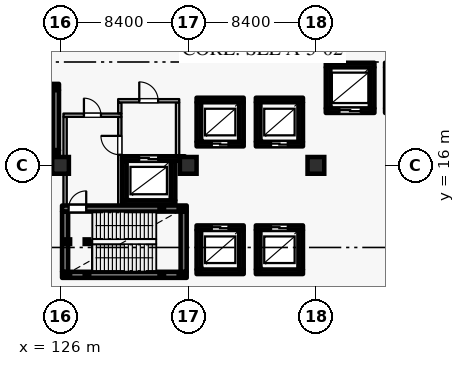
"""IFC4 building model, lengths in metres.
Left out: names, types, materials, properties, quantities, classifications, styles, units other than length and angle.
Written with IfcOpenShell. Run it as: python <this file> out.ifc"""

import sys

from ifc_helpers import new_model, si_unit, direction, frame, frame_2d, origin, origin_2d, place, context, subcontext, project, spatial, rectangle, hollow_rectangle, circle, extrude, element, fill, save


model = new_model("IFC4")
c1 = context("Model", 3, precision=1e-05, world=origin(), true_north=direction((0.0, 1.0)))
c2 = subcontext(c1, "Body", "Model", "MODEL_VIEW")
j1 = project(units=[si_unit("LENGTHUNIT", "METRE"), si_unit("PLANEANGLEUNIT", "RADIAN")], contexts=[c1])
p1 = place(None, origin())
s1 = spatial("IfcSite", under=j1, at=p1, CompositionType="ELEMENT")
p2 = place(p1, origin())
s2 = spatial("IfcBuilding", under=s1, at=p2, CompositionType="ELEMENT")
p3 = place(p2, origin())
s3 = spatial("IfcBuildingStorey", under=s2, at=p3, CompositionType="ELEMENT", Elevation=0.0)
for number, where, z_axis, x_axis in (
    (1, (126.0, 16.0, 0.0), (0.0, 0.0, 1.0), (1.0, 0.0, 0.0)),
    (2, (134.4, 16.0, 0.0), (0.0, 0.0, 1.0), (1.0, 0.0, 0.0)),
    (3, (142.8, 16.0, 0.0), (0.0, 0.0, 1.0), (1.0, 0.0, 0.0)),
):
    element("IfcColumn", number, at=place(p3, frame(where, z_axis=z_axis, x_axis=x_axis)), inside=s3, PredefinedType="COLUMN", context=c2, shape_type="SweptSolid", body=[
        extrude(circle(Radius=0.55, at=origin_2d()), origin(), (0.0, 0.0, 1.0), 6.0),
    ])
p4 = place(p3, frame((134.95, 17.4, 0.0), z_axis=(0.0, 0.0, 1.0), x_axis=(1.0, 0.0, 0.0)))
e4 = element("IfcWall", 4, at=p4, inside=s3, PredefinedType="SHEAR", context=c2, shape_type="SweptSolid", body=[
    extrude(rectangle(XDim=3.1, YDim=0.3, at=frame_2d((1.55, 0.0))), origin(), (0.0, 0.0, 1.0), 5.675),
])
p5 = place(p4, frame((1.0, 0.0, 0.0)))
e5 = element("IfcOpeningElement", 5, at=p5, cuts=e4, PredefinedType="OPENING", context=c2, shape_type="SweptSolid", body=[
    extrude(rectangle(XDim=1.1, YDim=2.2, at=frame_2d((0.55, 1.1))), frame((0.0, 0.16, 0.0), z_axis=(0.0, -1.0, 0.0), x_axis=(1.0, 0.0, 0.0)), (0.0, 0.0, 1.0), 0.32),
])
p6 = place(p3, frame((137.9, 17.555, 0.0), z_axis=(0.0, 0.0, 1.0), x_axis=(0.0, 1.0, 0.0)))
e6 = element("IfcWall", 6, at=p6, inside=s3, PredefinedType="SHEAR", context=c2, shape_type="SweptSolid", body=[
    extrude(rectangle(XDim=2.59, YDim=0.3, at=frame_2d((1.295, 0.0))), origin(), (0.0, 0.0, 1.0), 5.675),
])
p7 = place(p3, frame((138.05, 20.3, 0.0), z_axis=(0.0, 0.0, 1.0), x_axis=(-1.0, 0.0, 0.0)))
e7 = element("IfcWall", 7, at=p7, inside=s3, PredefinedType="SHEAR", context=c2, shape_type="SweptSolid", body=[
    extrude(rectangle(XDim=3.1, YDim=0.3, at=frame_2d((1.55, 0.0))), origin(), (0.0, 0.0, 1.0), 5.675),
])
p8 = place(p3, frame((135.1, 20.145, 0.0), z_axis=(0.0, 0.0, 1.0), x_axis=(0.0, -1.0, 0.0)))
e8 = element("IfcWall", 8, at=p8, inside=s3, PredefinedType="SHEAR", context=c2, shape_type="SweptSolid", body=[
    extrude(rectangle(XDim=2.59, YDim=0.3, at=frame_2d((1.295, 0.0))), origin(), (0.0, 0.0, 1.0), 5.675),
])
p9 = place(p3, frame((138.85, 17.4, 0.0), z_axis=(0.0, 0.0, 1.0), x_axis=(1.0, 0.0, 0.0)))
e9 = element("IfcWall", 9, at=p9, inside=s3, PredefinedType="SHEAR", context=c2, shape_type="SweptSolid", body=[
    extrude(rectangle(XDim=3.1, YDim=0.3, at=frame_2d((1.55, 0.0))), origin(), (0.0, 0.0, 1.0), 5.675),
])
p10 = place(p9, frame((1.0, 0.0, 0.0)))
e10 = element("IfcOpeningElement", 10, at=p10, cuts=e9, PredefinedType="OPENING", context=c2, shape_type="SweptSolid", body=[
    extrude(rectangle(XDim=1.1, YDim=2.2, at=frame_2d((0.55, 1.1))), frame((0.0, 0.16, 0.0), z_axis=(0.0, -1.0, 0.0), x_axis=(1.0, 0.0, 0.0)), (0.0, 0.0, 1.0), 0.32),
])
p11 = place(p3, frame((141.8, 17.555, 0.0), z_axis=(0.0, 0.0, 1.0), x_axis=(0.0, 1.0, 0.0)))
e11 = element("IfcWall", 11, at=p11, inside=s3, PredefinedType="SHEAR", context=c2, shape_type="SweptSolid", body=[
    extrude(rectangle(XDim=2.59, YDim=0.3, at=frame_2d((1.295, 0.0))), origin(), (0.0, 0.0, 1.0), 5.675),
])
p12 = place(p3, frame((141.95, 20.3, 0.0), z_axis=(0.0, 0.0, 1.0), x_axis=(-1.0, 0.0, 0.0)))
e12 = element("IfcWall", 12, at=p12, inside=s3, PredefinedType="SHEAR", context=c2, shape_type="SweptSolid", body=[
    extrude(rectangle(XDim=3.1, YDim=0.3, at=frame_2d((1.55, 0.0))), origin(), (0.0, 0.0, 1.0), 5.675),
])
p13 = place(p3, frame((139.0, 20.145, 0.0), z_axis=(0.0, 0.0, 1.0), x_axis=(0.0, -1.0, 0.0)))
e13 = element("IfcWall", 13, at=p13, inside=s3, PredefinedType="SHEAR", context=c2, shape_type="SweptSolid", body=[
    extrude(rectangle(XDim=2.59, YDim=0.3, at=frame_2d((1.295, 0.0))), origin(), (0.0, 0.0, 1.0), 5.675),
])
p14 = place(p3, frame((134.95, 9.0, 0.0), z_axis=(0.0, 0.0, 1.0), x_axis=(1.0, 0.0, 0.0)))
e14 = element("IfcWall", 14, at=p14, inside=s3, PredefinedType="SHEAR", context=c2, shape_type="SweptSolid", body=[
    extrude(rectangle(XDim=3.1, YDim=0.3, at=frame_2d((1.55, 0.0))), origin(), (0.0, 0.0, 1.0), 5.675),
])
p15 = place(p3, frame((137.9, 9.155, 0.0), z_axis=(0.0, 0.0, 1.0), x_axis=(0.0, 1.0, 0.0)))
e15 = element("IfcWall", 15, at=p15, inside=s3, PredefinedType="SHEAR", context=c2, shape_type="SweptSolid", body=[
    extrude(rectangle(XDim=2.59, YDim=0.3, at=frame_2d((1.295, 0.0))), origin(), (0.0, 0.0, 1.0), 5.675),
])
p16 = place(p3, frame((138.05, 11.9, 0.0), z_axis=(0.0, 0.0, 1.0), x_axis=(-1.0, 0.0, 0.0)))
e16 = element("IfcWall", 16, at=p16, inside=s3, PredefinedType="SHEAR", context=c2, shape_type="SweptSolid", body=[
    extrude(rectangle(XDim=3.1, YDim=0.3, at=frame_2d((1.55, 0.0))), origin(), (0.0, 0.0, 1.0), 5.675),
])
p17 = place(p16, frame((1.0, 0.0, 0.0)))
e17 = element("IfcOpeningElement", 17, at=p17, cuts=e16, PredefinedType="OPENING", context=c2, shape_type="SweptSolid", body=[
    extrude(rectangle(XDim=1.1, YDim=2.2, at=frame_2d((0.55, 1.1))), frame((0.0, 0.16, 0.0), z_axis=(0.0, -1.0, 0.0), x_axis=(1.0, 0.0, 0.0)), (0.0, 0.0, 1.0), 0.32),
])
p18 = place(p3, frame((135.1, 11.745, 0.0), z_axis=(0.0, 0.0, 1.0), x_axis=(0.0, -1.0, 0.0)))
e18 = element("IfcWall", 18, at=p18, inside=s3, PredefinedType="SHEAR", context=c2, shape_type="SweptSolid", body=[
    extrude(rectangle(XDim=2.59, YDim=0.3, at=frame_2d((1.295, 0.0))), origin(), (0.0, 0.0, 1.0), 5.675),
])
p19 = place(p3, frame((138.85, 9.0, 0.0), z_axis=(0.0, 0.0, 1.0), x_axis=(1.0, 0.0, 0.0)))
e19 = element("IfcWall", 19, at=p19, inside=s3, PredefinedType="SHEAR", context=c2, shape_type="SweptSolid", body=[
    extrude(rectangle(XDim=3.1, YDim=0.3, at=frame_2d((1.55, 0.0))), origin(), (0.0, 0.0, 1.0), 5.675),
])
p20 = place(p3, frame((141.8, 9.155, 0.0), z_axis=(0.0, 0.0, 1.0), x_axis=(0.0, 1.0, 0.0)))
e20 = element("IfcWall", 20, at=p20, inside=s3, PredefinedType="SHEAR", context=c2, shape_type="SweptSolid", body=[
    extrude(rectangle(XDim=2.59, YDim=0.3, at=frame_2d((1.295, 0.0))), origin(), (0.0, 0.0, 1.0), 5.675),
])
p21 = place(p3, frame((141.95, 11.9, 0.0), z_axis=(0.0, 0.0, 1.0), x_axis=(-1.0, 0.0, 0.0)))
e21 = element("IfcWall", 21, at=p21, inside=s3, PredefinedType="SHEAR", context=c2, shape_type="SweptSolid", body=[
    extrude(rectangle(XDim=3.1, YDim=0.3, at=frame_2d((1.55, 0.0))), origin(), (0.0, 0.0, 1.0), 5.675),
])
p22 = place(p21, frame((1.0, 0.0, 0.0)))
e22 = element("IfcOpeningElement", 22, at=p22, cuts=e21, PredefinedType="OPENING", context=c2, shape_type="SweptSolid", body=[
    extrude(rectangle(XDim=1.1, YDim=2.2, at=frame_2d((0.55, 1.1))), frame((0.0, 0.16, 0.0), z_axis=(0.0, -1.0, 0.0), x_axis=(1.0, 0.0, 0.0)), (0.0, 0.0, 1.0), 0.32),
])
p23 = place(p3, frame((139.0, 11.745, 0.0), z_axis=(0.0, 0.0, 1.0), x_axis=(0.0, -1.0, 0.0)))
e23 = element("IfcWall", 23, at=p23, inside=s3, PredefinedType="SHEAR", context=c2, shape_type="SweptSolid", body=[
    extrude(rectangle(XDim=2.59, YDim=0.3, at=frame_2d((1.295, 0.0))), origin(), (0.0, 0.0, 1.0), 5.675),
])
p24 = place(p3, frame((130.05, 13.55, 0.0), z_axis=(0.0, 0.0, 1.0), x_axis=(1.0, 0.0, 0.0)))
e24 = element("IfcWall", 24, at=p24, inside=s3, PredefinedType="SHEAR", context=c2, shape_type="SweptSolid", body=[
    extrude(rectangle(XDim=3.5, YDim=0.3, at=frame_2d((1.75, 0.0))), origin(), (0.0, 0.0, 1.0), 5.675),
])
p25 = place(p3, frame((133.4, 13.705, 0.0), z_axis=(0.0, 0.0, 1.0), x_axis=(0.0, 1.0, 0.0)))
e25 = element("IfcWall", 25, at=p25, inside=s3, PredefinedType="SHEAR", context=c2, shape_type="SweptSolid", body=[
    extrude(rectangle(XDim=2.59, YDim=0.3, at=frame_2d((1.295, 0.0))), origin(), (0.0, 0.0, 1.0), 5.675),
])
p26 = place(p3, frame((134.18, 16.45, 0.0), z_axis=(0.0, 0.0, 1.0), x_axis=(-1.0, 0.0, 0.0)))
e26 = element("IfcWall", 26, at=p26, inside=s3, PredefinedType="SHEAR", context=c2, shape_type="SweptSolid", body=[
    extrude(rectangle(XDim=4.13, YDim=0.3, at=frame_2d((2.065, 0.0))), origin(), (0.0, 0.0, 1.0), 5.675),
])
p27 = place(p26, frame((1.755, 0.0, 0.0)))
e27 = element("IfcOpeningElement", 27, at=p27, cuts=e26, PredefinedType="OPENING", context=c2, shape_type="SweptSolid", body=[
    extrude(rectangle(XDim=1.25, YDim=2.25, at=frame_2d((0.625, 1.125))), frame((0.0, 0.16, 0.0), z_axis=(0.0, -1.0, 0.0), x_axis=(1.0, 0.0, 0.0)), (0.0, 0.0, 1.0), 0.32),
])
p28 = place(p3, frame((130.2, 16.295, 0.0), z_axis=(0.0, 0.0, 1.0), x_axis=(0.0, -1.0, 0.0)))
e28 = element("IfcWall", 28, at=p28, inside=s3, PredefinedType="SHEAR", context=c2, shape_type="SweptSolid", body=[
    extrude(rectangle(XDim=2.59, YDim=0.3, at=frame_2d((1.295, 0.0))), origin(), (0.0, 0.0, 1.0), 5.675),
])
p29 = place(p3, frame((143.45, 19.6, 0.0), z_axis=(0.0, 0.0, 1.0), x_axis=(1.0, 0.0, 0.0)))
e29 = element("IfcWall", 29, at=p29, inside=s3, PredefinedType="SHEAR", context=c2, shape_type="SweptSolid", body=[
    extrude(rectangle(XDim=3.2, YDim=0.3, at=frame_2d((1.6, 0.0))), origin(), (0.0, 0.0, 1.0), 5.675),
])
p30 = place(p29, frame((0.9, 0.0, 0.0)))
e30 = element("IfcOpeningElement", 30, at=p30, cuts=e29, PredefinedType="OPENING", context=c2, shape_type="SweptSolid", body=[
    extrude(rectangle(XDim=1.4, YDim=2.35, at=frame_2d((0.7, 1.175))), frame((0.0, 0.16, 0.0), z_axis=(0.0, -1.0, 0.0), x_axis=(1.0, 0.0, 0.0)), (0.0, 0.0, 1.0), 0.32),
])
p31 = place(p3, frame((146.5, 19.755, 0.0), z_axis=(0.0, 0.0, 1.0), x_axis=(0.0, 1.0, 0.0)))
e31 = element("IfcWall", 31, at=p31, inside=s3, PredefinedType="SHEAR", context=c2, shape_type="SweptSolid", body=[
    extrude(rectangle(XDim=2.69, YDim=0.3, at=frame_2d((1.345, 0.0))), origin(), (0.0, 0.0, 1.0), 5.675),
])
p32 = place(p3, frame((146.65, 22.6, 0.0), z_axis=(0.0, 0.0, 1.0), x_axis=(-1.0, 0.0, 0.0)))
e32 = element("IfcWall", 32, at=p32, inside=s3, PredefinedType="SHEAR", context=c2, shape_type="SweptSolid", body=[
    extrude(rectangle(XDim=3.2, YDim=0.3, at=frame_2d((1.6, 0.0))), origin(), (0.0, 0.0, 1.0), 5.675),
])
p33 = place(p3, frame((143.6, 22.445, 0.0), z_axis=(0.0, 0.0, 1.0), x_axis=(0.0, -1.0, 0.0)))
e33 = element("IfcWall", 33, at=p33, inside=s3, PredefinedType="SHEAR", context=c2, shape_type="SweptSolid", body=[
    extrude(rectangle(XDim=2.69, YDim=0.3, at=frame_2d((1.345, 0.0))), origin(), (0.0, 0.0, 1.0), 5.675),
])
p34 = place(p3, frame((126.1, 8.8, 0.0), z_axis=(0.0, 0.0, 1.0), x_axis=(1.0, 0.0, 0.0)))
e34 = element("IfcWall", 34, at=p34, inside=s3, PredefinedType="SHEAR", context=c2, shape_type="SweptSolid", body=[
    extrude(rectangle(XDim=8.2, YDim=0.4, at=frame_2d((4.1, 0.0))), origin(), (0.0, 0.0, 1.0), 5.675),
])
p35 = place(p3, frame((134.1, 9.005, 0.0), z_axis=(0.0, 0.0, 1.0), x_axis=(0.0, 1.0, 0.0)))
e35 = element("IfcWall", 35, at=p35, inside=s3, PredefinedType="SHEAR", context=c2, shape_type="SweptSolid", body=[
    extrude(rectangle(XDim=3.95, YDim=0.4, at=frame_2d((1.975, 0.0))), origin(), (0.0, 0.0, 1.0), 5.675),
])
p36 = place(p3, frame((126.1, 13.16, 0.0), z_axis=(0.0, 0.0, 1.0), x_axis=(1.0, 0.0, 0.0)))
e36 = element("IfcWall", 36, at=p36, inside=s3, PredefinedType="SHEAR", context=c2, shape_type="SweptSolid", body=[
    extrude(rectangle(XDim=8.2, YDim=0.4, at=frame_2d((4.1, 0.0))), origin(), (0.0, 0.0, 1.0), 5.675),
])
p37 = place(p36, frame((0.43, 0.0, 0.0)))
e37 = element("IfcOpeningElement", 37, at=p37, cuts=e36, PredefinedType="OPENING", context=c2, shape_type="SweptSolid", body=[
    extrude(rectangle(XDim=1.16, YDim=2.2, at=frame_2d((0.58, 1.1))), frame((0.0, 0.21, 0.0), z_axis=(0.0, -1.0, 0.0), x_axis=(1.0, 0.0, 0.0)), (0.0, 0.0, 1.0), 0.42),
])
p38 = place(p3, frame((126.3, 9.005, 0.0), z_axis=(0.0, 0.0, 1.0), x_axis=(0.0, 1.0, 0.0)))
e38 = element("IfcWall", 38, at=p38, inside=s3, PredefinedType="SHEAR", context=c2, shape_type="SweptSolid", body=[
    extrude(rectangle(XDim=3.95, YDim=0.4, at=frame_2d((1.975, 0.0))), origin(), (0.0, 0.0, 1.0), 5.675),
])
p39 = place(p3, frame((126.3, 13.365, 0.0), z_axis=(0.0, 0.0, 1.0), x_axis=(0.0, 1.0, 0.0)))
e39 = element("IfcWall", 39, at=p39, inside=s3, PredefinedType="PARTITIONING", context=c2, shape_type="SweptSolid", body=[
    extrude(rectangle(XDim=5.82, YDim=0.22, at=frame_2d((2.91, 0.0))), origin(), (0.0, 0.0, 1.0), 4.75),
])
p40 = place(p3, frame((126.19, 19.3, 0.0), z_axis=(0.0, 0.0, 1.0), x_axis=(1.0, 0.0, 0.0)))
e40 = element("IfcWall", 40, at=p40, inside=s3, PredefinedType="PARTITIONING", context=c2, shape_type="SweptSolid", body=[
    extrude(rectangle(XDim=3.82, YDim=0.22, at=frame_2d((1.91, 0.0))), origin(), (0.0, 0.0, 1.0), 5.675),
])
p41 = place(p40, frame((1.35, 0.0, 0.0)))
e41 = element("IfcOpeningElement", 41, at=p41, cuts=e40, PredefinedType="OPENING", context=c2, shape_type="SweptSolid", body=[
    extrude(rectangle(XDim=1.12, YDim=2.2, at=frame_2d((0.56, 1.1))), frame((0.0, 0.12, 0.0), z_axis=(0.0, -1.0, 0.0), x_axis=(1.0, 0.0, 0.0)), (0.0, 0.0, 1.0), 0.24),
])
p42 = place(p3, frame((129.9, 13.365, 0.0), z_axis=(0.0, 0.0, 1.0), x_axis=(0.0, 1.0, 0.0)))
e42 = element("IfcWall", 42, at=p42, inside=s3, PredefinedType="PARTITIONING", context=c2, shape_type="SweptSolid", body=[
    extrude(rectangle(XDim=5.82, YDim=0.22, at=frame_2d((2.91, 0.0))), origin(), (0.0, 0.0, 1.0), 5.675),
])
p43 = place(p42, frame((3.335, 0.0, 0.0)))
e43 = element("IfcOpeningElement", 43, at=p43, cuts=e42, PredefinedType="OPENING", context=c2, shape_type="SweptSolid", body=[
    extrude(rectangle(XDim=1.24, YDim=2.2, at=frame_2d((0.62, 1.1))), frame((0.0, 0.12, 0.0), z_axis=(0.0, -1.0, 0.0), x_axis=(1.0, 0.0, 0.0)), (0.0, 0.0, 1.0), 0.24),
])
p44 = place(p3, frame((129.9, 19.415, 0.0), z_axis=(0.0, 0.0, 1.0), x_axis=(0.0, 1.0, 0.0)))
e44 = element("IfcWall", 44, at=p44, inside=s3, PredefinedType="PARTITIONING", context=c2, shape_type="SweptSolid", body=[
    extrude(rectangle(XDim=0.72, YDim=0.22, at=frame_2d((0.36, 0.0))), origin(), (0.0, 0.0, 1.0), 5.675),
])
p45 = place(p3, frame((133.7, 16.605, 0.0), z_axis=(0.0, 0.0, 1.0), x_axis=(0.0, 1.0, 0.0)))
e45 = element("IfcWall", 45, at=p45, inside=s3, PredefinedType="PARTITIONING", context=c2, shape_type="SweptSolid", body=[
    extrude(rectangle(XDim=3.53, YDim=0.22, at=frame_2d((1.765, 0.0))), origin(), (0.0, 0.0, 1.0), 5.675),
])
p46 = place(p3, frame((129.79, 20.25, 0.0), z_axis=(0.0, 0.0, 1.0), x_axis=(1.0, 0.0, 0.0)))
e46 = element("IfcWall", 46, at=p46, inside=s3, PredefinedType="PARTITIONING", context=c2, shape_type="SweptSolid", body=[
    extrude(rectangle(XDim=4.02, YDim=0.22, at=frame_2d((2.01, 0.0))), origin(), (0.0, 0.0, 1.0), 5.675),
])
p47 = place(p46, frame((1.39, 0.0, 0.0)))
e47 = element("IfcOpeningElement", 47, at=p47, cuts=e46, PredefinedType="OPENING", context=c2, shape_type="SweptSolid", body=[
    extrude(rectangle(XDim=1.24, YDim=2.2, at=frame_2d((0.62, 1.1))), frame((0.0, 0.12, 0.0), z_axis=(0.0, -1.0, 0.0), x_axis=(1.0, 0.0, 0.0)), (0.0, 0.0, 1.0), 0.24),
])
for number, where, z_axis, x_axis in (
    (48, (126.48, 8.8, 0.0), (0.0, 0.0, 1.0), (1.0, 0.0, 0.0)),
    (49, (126.48, 10.98, 0.0), (0.0, 0.0, 1.0), (1.0, 0.0, 0.0)),
    (50, (127.74, 8.8, 0.0), (0.0, 0.0, 1.0), (1.0, 0.0, 0.0)),
    (51, (127.74, 10.98, 0.0), (0.0, 0.0, 1.0), (1.0, 0.0, 0.0)),
):
    element("IfcColumn", number, at=place(p3, frame(where, z_axis=z_axis, x_axis=x_axis)), inside=s3, PredefinedType="COLUMN", context=c2, shape_type="SweptSolid", body=[
        extrude(hollow_rectangle(XDim=0.3, YDim=0.3, WallThickness=0.012, at=origin_2d()), origin(), (0.0, 0.0, 1.0), 5.82),
    ])
for number, where, z_axis, x_axis in (
    (52, (132.66, 8.8, -2.7), (0.0, 0.0, 1.0), (1.0, 0.0, 0.0)),
    (53, (132.66, 13.16, -2.7), (0.0, 0.0, 1.0), (1.0, 0.0, 0.0)),
    (54, (133.92, 8.8, -2.7), (0.0, 0.0, 1.0), (1.0, 0.0, 0.0)),
    (55, (133.92, 13.16, -2.7), (0.0, 0.0, 1.0), (1.0, 0.0, 0.0)),
):
    element("IfcColumn", number, at=place(p3, frame(where, z_axis=z_axis, x_axis=x_axis)), inside=s3, PredefinedType="COLUMN", context=c2, shape_type="SweptSolid", body=[
        extrude(hollow_rectangle(XDim=0.3, YDim=0.3, WallThickness=0.012, at=origin_2d()), origin(), (0.0, 0.0, 1.0), 5.52),
    ])
p48 = place(p3, frame((117.7, 16.8, 0.0), z_axis=(0.0, 0.0, 1.0), x_axis=(1.0, 0.0, 0.0)))
e56 = element("IfcWall", 56, at=p48, inside=s3, PredefinedType="SHEAR", context=c2, shape_type="SweptSolid", body=[
    extrude(rectangle(XDim=8.2, YDim=0.4, at=frame_2d((4.1, 0.0))), origin(), (0.0, 0.0, 1.0), 5.675),
])
p49 = place(p3, frame((125.7, 17.005, 0.0), z_axis=(0.0, 0.0, 1.0), x_axis=(0.0, 1.0, 0.0)))
e57 = element("IfcWall", 57, at=p49, inside=s3, PredefinedType="SHEAR", context=c2, shape_type="SweptSolid", body=[
    extrude(rectangle(XDim=3.95, YDim=0.4, at=frame_2d((1.975, 0.0))), origin(), (0.0, 0.0, 1.0), 5.675),
])
p50 = place(p3, frame((117.7, 21.16, 0.0), z_axis=(0.0, 0.0, 1.0), x_axis=(1.0, 0.0, 0.0)))
e58 = element("IfcWall", 58, at=p50, inside=s3, PredefinedType="SHEAR", context=c2, shape_type="SweptSolid", body=[
    extrude(rectangle(XDim=8.2, YDim=0.4, at=frame_2d((4.1, 0.0))), origin(), (0.0, 0.0, 1.0), 5.675),
])
p51 = place(p50, frame((0.43, 0.0, 0.0)))
e59 = element("IfcOpeningElement", 59, at=p51, cuts=e58, PredefinedType="OPENING", context=c2, shape_type="SweptSolid", body=[
    extrude(rectangle(XDim=1.16, YDim=2.2, at=frame_2d((0.58, 1.1))), frame((0.0, 0.21, 0.0), z_axis=(0.0, -1.0, 0.0), x_axis=(1.0, 0.0, 0.0)), (0.0, 0.0, 1.0), 0.42),
])
for number, where, z_axis, x_axis in (
    (60, (125.52, 16.8, -2.7), (0.0, 0.0, 1.0), (1.0, 0.0, 0.0)),
    (61, (125.52, 21.16, -2.7), (0.0, 0.0, 1.0), (1.0, 0.0, 0.0)),
):
    element("IfcColumn", number, at=place(p3, frame(where, z_axis=z_axis, x_axis=x_axis)), inside=s3, PredefinedType="COLUMN", context=c2, shape_type="SweptSolid", body=[
        extrude(hollow_rectangle(XDim=0.3, YDim=0.3, WallThickness=0.012, at=origin_2d()), origin(), (0.0, 0.0, 1.0), 5.52),
    ])
p52 = place(p5, origin())
e62 = element("IfcDoor", 62, at=p52, inside=s3, OperationType="DOUBLE_DOOR_SLIDING", PredefinedType="DOOR", context=c2, shape_type="SweptSolid", body=[
    extrude(rectangle(XDim=1.1, YDim=2.2, at=frame_2d((0.55, 1.1))), frame((0.0, 0.025, 0.0), z_axis=(0.0, -1.0, 0.0), x_axis=(1.0, 0.0, 0.0)), (0.0, 0.0, 1.0), 0.05),
])
fill(e5, e62)
p53 = place(p10, origin())
e63 = element("IfcDoor", 63, at=p53, inside=s3, OperationType="DOUBLE_DOOR_SLIDING", PredefinedType="DOOR", context=c2, shape_type="SweptSolid", body=[
    extrude(rectangle(XDim=1.1, YDim=2.2, at=frame_2d((0.55, 1.1))), frame((0.0, 0.025, 0.0), z_axis=(0.0, -1.0, 0.0), x_axis=(1.0, 0.0, 0.0)), (0.0, 0.0, 1.0), 0.05),
])
fill(e10, e63)
p54 = place(p17, origin())
e64 = element("IfcDoor", 64, at=p54, inside=s3, OperationType="DOUBLE_DOOR_SLIDING", PredefinedType="DOOR", context=c2, shape_type="SweptSolid", body=[
    extrude(rectangle(XDim=1.1, YDim=2.2, at=frame_2d((0.55, 1.1))), frame((0.0, 0.025, 0.0), z_axis=(0.0, -1.0, 0.0), x_axis=(1.0, 0.0, 0.0)), (0.0, 0.0, 1.0), 0.05),
])
fill(e17, e64)
p55 = place(p22, origin())
e65 = element("IfcDoor", 65, at=p55, inside=s3, OperationType="DOUBLE_DOOR_SLIDING", PredefinedType="DOOR", context=c2, shape_type="SweptSolid", body=[
    extrude(rectangle(XDim=1.1, YDim=2.2, at=frame_2d((0.55, 1.1))), frame((0.0, 0.025, 0.0), z_axis=(0.0, -1.0, 0.0), x_axis=(1.0, 0.0, 0.0)), (0.0, 0.0, 1.0), 0.05),
])
fill(e22, e65)
p56 = place(p27, origin())
e66 = element("IfcDoor", 66, at=p56, inside=s3, OperationType="DOUBLE_DOOR_SLIDING", PredefinedType="DOOR", context=c2, shape_type="SweptSolid", body=[
    extrude(rectangle(XDim=1.25, YDim=2.25, at=frame_2d((0.625, 1.125))), frame((0.0, 0.025, 0.0), z_axis=(0.0, -1.0, 0.0), x_axis=(1.0, 0.0, 0.0)), (0.0, 0.0, 1.0), 0.05),
])
fill(e27, e66)
p57 = place(p30, origin())
e67 = element("IfcDoor", 67, at=p57, inside=s3, OperationType="DOUBLE_DOOR_SLIDING", PredefinedType="DOOR", context=c2, shape_type="SweptSolid", body=[
    extrude(rectangle(XDim=1.4, YDim=2.35, at=frame_2d((0.7, 1.175))), frame((0.0, 0.025, 0.0), z_axis=(0.0, -1.0, 0.0), x_axis=(1.0, 0.0, 0.0)), (0.0, 0.0, 1.0), 0.05),
])
fill(e30, e67)
p58 = place(p37, origin())
e68 = element("IfcDoor", 68, at=p58, inside=s3, OperationType="SINGLE_SWING_RIGHT", PredefinedType="DOOR", context=c2, shape_type="SweptSolid", body=[
    extrude(rectangle(XDim=1.16, YDim=2.2, at=frame_2d((0.58, 1.1))), frame((0.0, 0.025, 0.0), z_axis=(0.0, -1.0, 0.0), x_axis=(1.0, 0.0, 0.0)), (0.0, 0.0, 1.0), 0.05),
])
fill(e37, e68)
p59 = place(p41, origin())
e69 = element("IfcDoor", 69, at=p59, inside=s3, OperationType="SINGLE_SWING_LEFT", PredefinedType="DOOR", context=c2, shape_type="SweptSolid", body=[
    extrude(rectangle(XDim=1.12, YDim=2.2, at=frame_2d((0.56, 1.1))), frame((0.0, 0.025, 0.0), z_axis=(0.0, -1.0, 0.0), x_axis=(1.0, 0.0, 0.0)), (0.0, 0.0, 1.0), 0.05),
])
fill(e41, e69)
p60 = place(p43, origin())
e70 = element("IfcDoor", 70, at=p60, inside=s3, OperationType="SINGLE_SWING_RIGHT", PredefinedType="DOOR", context=c2, shape_type="SweptSolid", body=[
    extrude(rectangle(XDim=1.24, YDim=2.2, at=frame_2d((0.62, 1.1))), frame((0.0, 0.025, 0.0), z_axis=(0.0, -1.0, 0.0), x_axis=(1.0, 0.0, 0.0)), (0.0, 0.0, 1.0), 0.05),
])
fill(e43, e70)
p61 = place(p47, origin())
e71 = element("IfcDoor", 71, at=p61, inside=s3, OperationType="SINGLE_SWING_LEFT", PredefinedType="DOOR", context=c2, shape_type="SweptSolid", body=[
    extrude(rectangle(XDim=1.24, YDim=2.2, at=frame_2d((0.62, 1.1))), frame((0.0, 0.025, 0.0), z_axis=(0.0, -1.0, 0.0), x_axis=(1.0, 0.0, 0.0)), (0.0, 0.0, 1.0), 0.05),
])
fill(e47, e71)
save(model, sys.argv[1])
